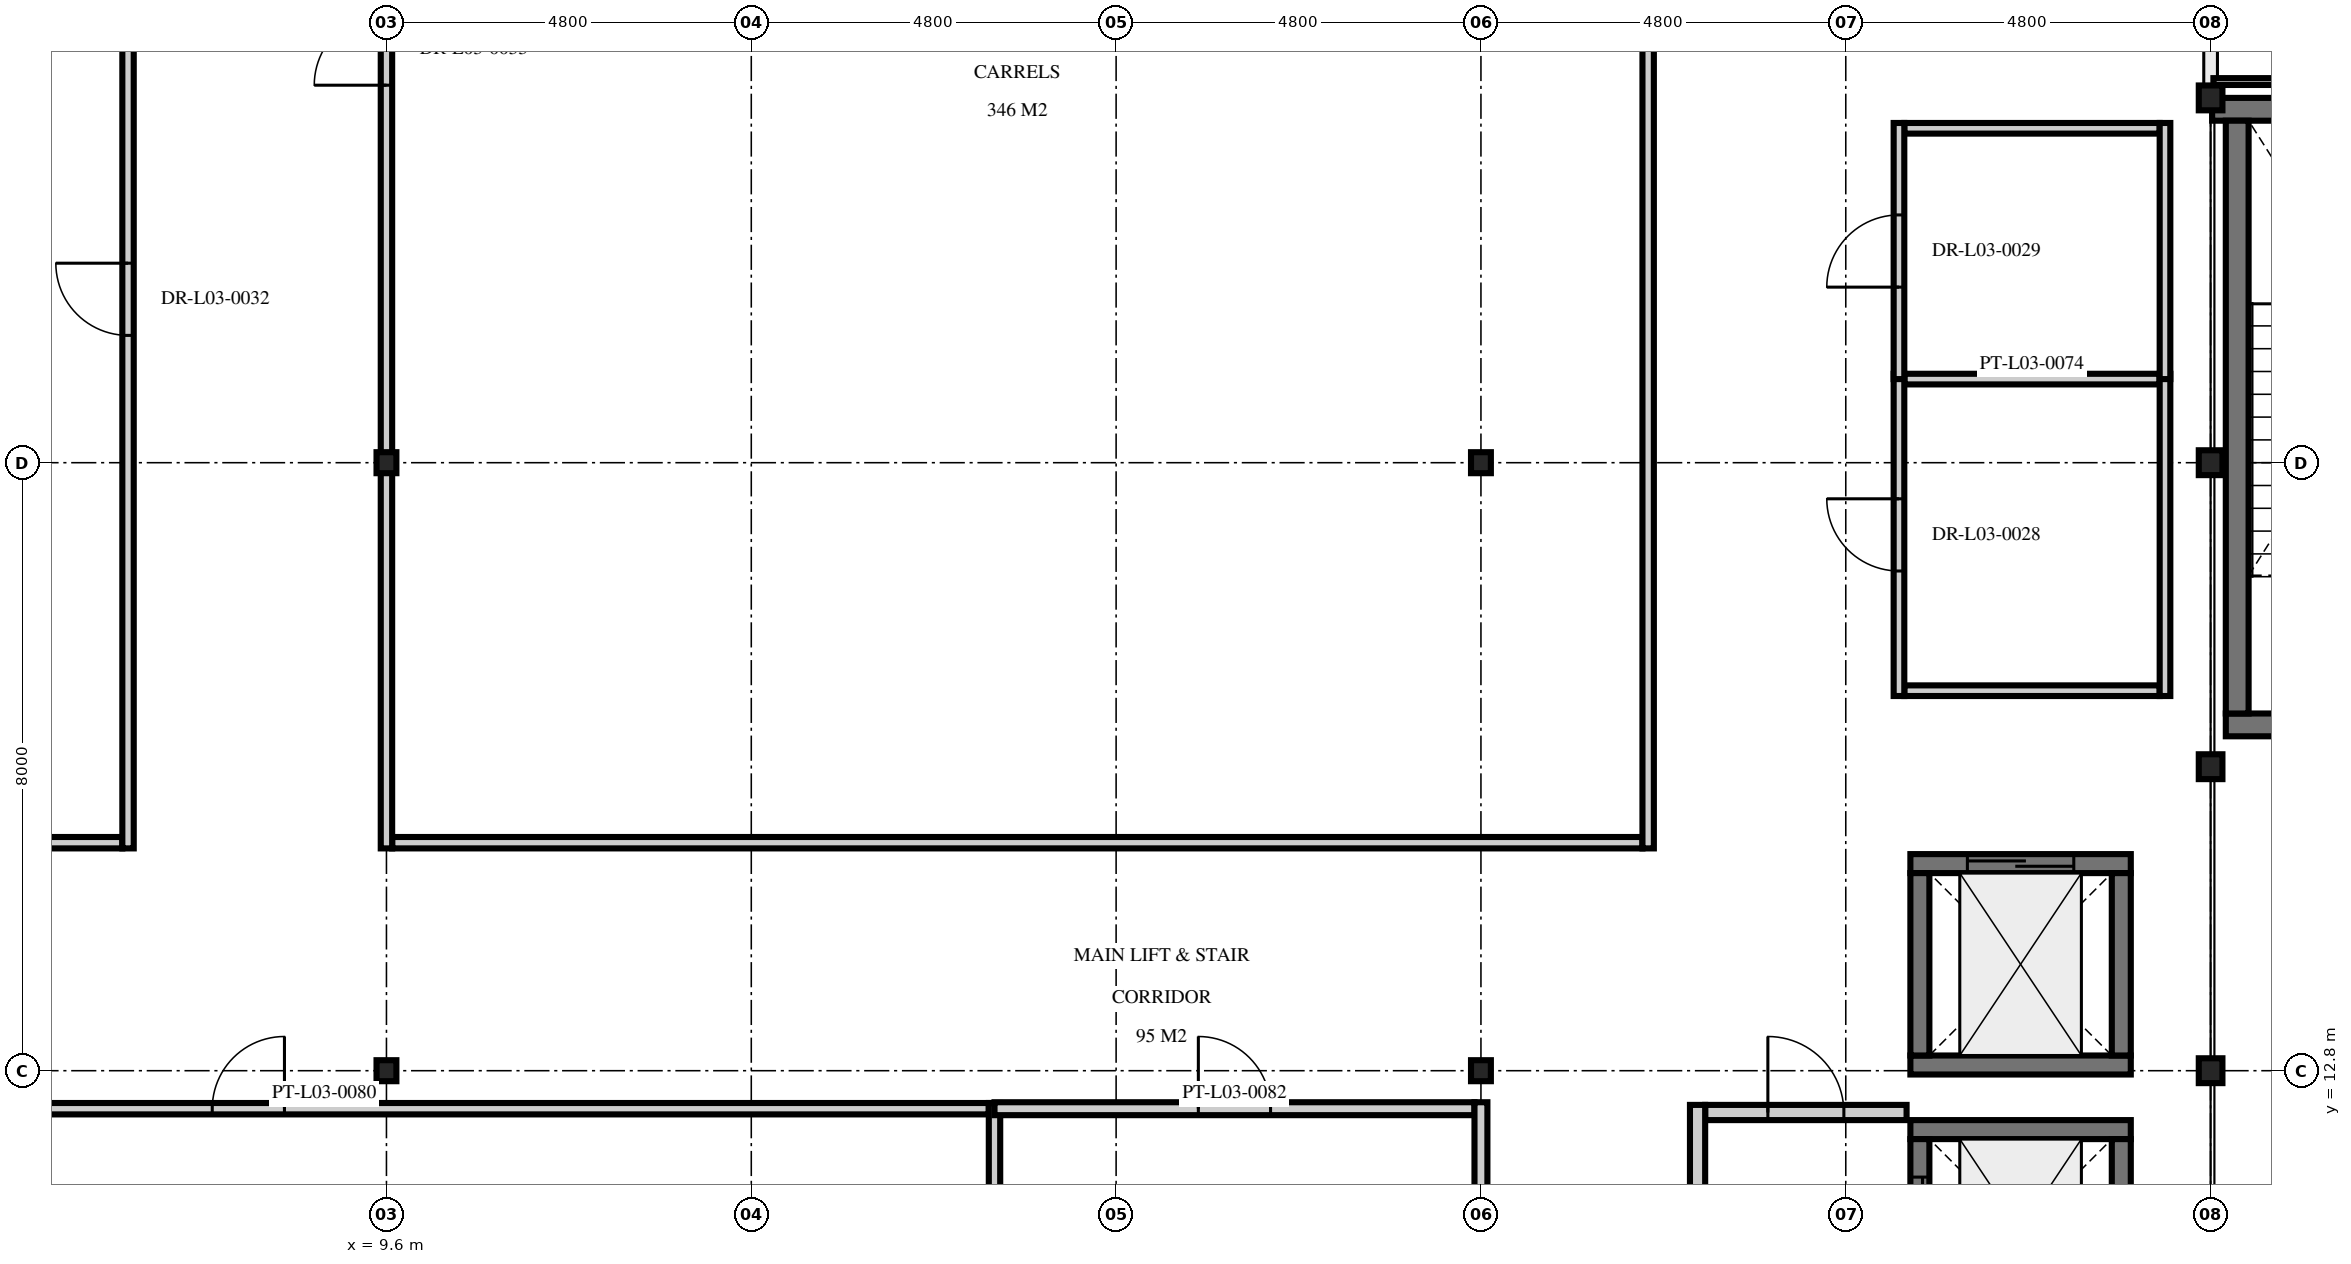
"""IFC4 building model, lengths in metres.
Left out: names, types, materials, properties, quantities, classifications, styles, units other than length and angle.
Written with IfcOpenShell. Run it as: python <this file> out.ifc"""

import sys

from ifc_helpers import new_model, si_unit, direction, frame, frame_2d, origin, origin_2d, place, context, subcontext, project, spatial, rectangle, i_section, extrude, element, fill, save


model = new_model("IFC4")
c1 = context("Model", 3, precision=1e-05, world=origin(), true_north=direction((0.0, 1.0)))
c2 = subcontext(c1, "Body", "Model", "MODEL_VIEW")
j1 = project(units=[si_unit("LENGTHUNIT", "METRE"), si_unit("PLANEANGLEUNIT", "RADIAN")], contexts=[c1])
p1 = place(None, origin())
s1 = spatial("IfcSite", under=j1, at=p1, CompositionType="ELEMENT")
p2 = place(p1, origin())
s2 = spatial("IfcBuilding", under=s1, at=p2, CompositionType="ELEMENT")
p3 = place(p2, frame((0.0, 0.0, 14.1)))
s3 = spatial("IfcBuildingStorey", under=s2, at=p3, CompositionType="ELEMENT", Elevation=14.1)
for number, where, z_axis, x_axis in (
    (1, (33.6, 12.8, 0.0), (0.0, 0.0, 1.0), (1.0, 0.0, 0.0)),
    (2, (33.6, 16.8, 0.0), (0.0, 0.0, 1.0), (1.0, 0.0, 0.0)),
    (3, (33.6, 20.8, 0.0), (0.0, 0.0, 1.0), (1.0, 0.0, 0.0)),
    (4, (33.6, 25.6, 0.0), (0.0, 0.0, 1.0), (1.0, 0.0, 0.0)),
):
    element("IfcColumn", number, at=place(p3, frame(where, z_axis=z_axis, x_axis=x_axis)), inside=s3, PredefinedType="COLUMN", context=c2, shape_type="SweptSolid", body=[
        extrude(i_section(OverallWidth=0.311, OverallDepth=0.327, WebThickness=0.016, FlangeThickness=0.025, at=origin_2d()), origin(), (0.0, 0.0, 1.0), 4.5),
    ])
for number, where, z_axis, x_axis in (
    (5, (9.6, 12.8, 0.0), (0.0, 0.0, 1.0), (1.0, 0.0, 0.0)),
    (6, (9.6, 20.8, 0.0), (0.0, 0.0, 1.0), (1.0, 0.0, 0.0)),
    (7, (24.0, 12.8, 0.0), (0.0, 0.0, 1.0), (1.0, 0.0, 0.0)),
    (8, (24.0, 20.8, 0.0), (0.0, 0.0, 1.0), (1.0, 0.0, 0.0)),
):
    element("IfcColumn", number, at=place(p3, frame(where, z_axis=z_axis, x_axis=x_axis)), inside=s3, PredefinedType="COLUMN", context=c2, shape_type="SweptSolid", body=[
        extrude(i_section(OverallWidth=0.261, OverallDepth=0.276, WebThickness=0.015, FlangeThickness=0.025, at=origin_2d()), origin(), (0.0, 0.0, 1.0), 4.5),
    ])
p4 = place(p3, frame((38.2, 17.35, 0.0), z_axis=(0.0, 0.0, 1.0), x_axis=(-1.0, 0.0, 0.0)))
e9 = element("IfcWall", 9, at=p4, inside=s3, PredefinedType="SHEAR", context=c2, shape_type="SweptSolid", body=[
    extrude(rectangle(XDim=4.4, YDim=0.3, at=frame_2d((2.2, 0.0))), origin(), (0.0, 0.0, 1.0), 4.25),
])
p5 = place(p4, frame((1.65, 0.0, 0.0)))
e10 = element("IfcOpeningElement", 10, at=p5, cuts=e9, PredefinedType="OPENING", context=c2, shape_type="SweptSolid", body=[
    extrude(rectangle(XDim=1.1, YDim=2.2, at=frame_2d((0.55, 1.1))), frame((0.0, 0.16, 0.0), z_axis=(0.0, -1.0, 0.0), x_axis=(1.0, 0.0, 0.0)), (0.0, 0.0, 1.0), 0.32),
])
p6 = place(p3, frame((33.62, 25.45, 0.0), z_axis=(0.0, 0.0, 1.0), x_axis=(1.0, 0.0, 0.0)))
e11 = element("IfcWall", 11, at=p6, inside=s3, PredefinedType="SHEAR", context=c2, shape_type="SweptSolid", body=[
    extrude(rectangle(XDim=4.76, YDim=0.3, at=frame_2d((2.38, 0.0))), origin(), (0.0, 0.0, 1.0), 4.25),
])
p7 = place(p3, frame((33.95, 17.5, 0.0), z_axis=(0.0, 0.0, 1.0), x_axis=(0.0, 1.0, 0.0)))
e12 = element("IfcWall", 12, at=p7, inside=s3, PredefinedType="SHEAR", context=c2, shape_type="SweptSolid", body=[
    extrude(rectangle(XDim=7.8, YDim=0.3, at=frame_2d((3.9, 0.0))), origin(), (0.0, 0.0, 1.0), 4.25),
])
p8 = place(p3, frame((29.65, 12.025, 0.0), z_axis=(0.0, 0.0, 1.0), x_axis=(1.0, 0.0, 0.0)))
e13 = element("IfcWall", 13, at=p8, inside=s3, PredefinedType="SHEAR", context=c2, shape_type="SweptSolid", body=[
    extrude(rectangle(XDim=2.9, YDim=0.25, at=frame_2d((1.45, 0.0))), origin(), (0.0, 0.0, 1.0), 4.25),
])
p9 = place(p3, frame((29.775, 9.5, 0.0), z_axis=(0.0, 0.0, 1.0), x_axis=(0.0, 1.0, 0.0)))
e14 = element("IfcWall", 14, at=p9, inside=s3, PredefinedType="SHEAR", context=c2, shape_type="SweptSolid", body=[
    extrude(rectangle(XDim=2.4, YDim=0.25, at=frame_2d((1.2, 0.0))), origin(), (0.0, 0.0, 1.0), 4.25),
])
p10 = place(p9, frame((0.5, 0.0, 0.0)))
e15 = element("IfcOpeningElement", 15, at=p10, cuts=e14, PredefinedType="OPENING", context=c2, shape_type="SweptSolid", body=[
    extrude(rectangle(XDim=1.4, YDim=2.2, at=frame_2d((0.7, 1.1))), frame((0.0, 0.135, 0.0), z_axis=(0.0, -1.0, 0.0), x_axis=(1.0, 0.0, 0.0)), (0.0, 0.0, 1.0), 0.27),
])
p11 = place(p3, frame((32.425, 11.9, 0.0), z_axis=(0.0, 0.0, 1.0), x_axis=(0.0, -1.0, 0.0)))
e16 = element("IfcWall", 16, at=p11, inside=s3, PredefinedType="SHEAR", context=c2, shape_type="SweptSolid", body=[
    extrude(rectangle(XDim=2.4, YDim=0.25, at=frame_2d((1.2, 0.0))), origin(), (0.0, 0.0, 1.0), 4.25),
])
p12 = place(p3, frame((32.55, 12.875, 0.0), z_axis=(0.0, 0.0, 1.0), x_axis=(-1.0, 0.0, 0.0)))
e17 = element("IfcWall", 17, at=p12, inside=s3, PredefinedType="SHEAR", context=c2, shape_type="SweptSolid", body=[
    extrude(rectangle(XDim=2.9, YDim=0.25, at=frame_2d((1.45, 0.0))), origin(), (0.0, 0.0, 1.0), 4.25),
])
p13 = place(p3, frame((29.65, 15.525, 0.0), z_axis=(0.0, 0.0, 1.0), x_axis=(1.0, 0.0, 0.0)))
e18 = element("IfcWall", 18, at=p13, inside=s3, PredefinedType="SHEAR", context=c2, shape_type="SweptSolid", body=[
    extrude(rectangle(XDim=2.9, YDim=0.25, at=frame_2d((1.45, 0.0))), origin(), (0.0, 0.0, 1.0), 4.25),
])
p14 = place(p13, frame((0.75, 0.0, 0.0)))
e19 = element("IfcOpeningElement", 19, at=p14, cuts=e18, PredefinedType="OPENING", context=c2, shape_type="SweptSolid", body=[
    extrude(rectangle(XDim=1.4, YDim=2.2, at=frame_2d((0.7, 1.1))), frame((0.0, 0.135, 0.0), z_axis=(0.0, -1.0, 0.0), x_axis=(1.0, 0.0, 0.0)), (0.0, 0.0, 1.0), 0.27),
])
for number, where, z_axis, x_axis in (
    (20, (29.775, 13.0, 0.0), (0.0, 0.0, 1.0), (0.0, 1.0, 0.0)),
    (21, (32.425, 15.4, 0.0), (0.0, 0.0, 1.0), (0.0, -1.0, 0.0)),
):
    element("IfcWall", number, at=place(p3, frame(where, z_axis=z_axis, x_axis=x_axis)), inside=s3, PredefinedType="SHEAR", context=c2, shape_type="SweptSolid", body=[
        extrude(rectangle(XDim=2.4, YDim=0.25, at=frame_2d((1.2, 0.0))), origin(), (0.0, 0.0, 1.0), 4.25),
    ])
p15 = place(p3, frame((26.95, 12.25, 0.0), z_axis=(0.0, 0.0, 1.0), x_axis=(1.0, 0.0, 0.0)))
e22 = element("IfcWall", 22, at=p15, inside=s3, PredefinedType="PARTITIONING", context=c2, shape_type="SweptSolid", body=[
    extrude(rectangle(XDim=2.65, YDim=0.2, at=frame_2d((1.325, 0.0))), origin(), (0.0, 0.0, 1.0), 4.25),
])
p16 = place(p15, frame((0.825, 0.0, 0.0)))
e23 = element("IfcOpeningElement", 23, at=p16, cuts=e22, PredefinedType="OPENING", context=c2, shape_type="SweptSolid", body=[
    extrude(rectangle(XDim=1.0, YDim=2.2, at=frame_2d((0.5, 1.1))), frame((0.0, 0.11, 0.0), z_axis=(0.0, -1.0, 0.0), x_axis=(1.0, 0.0, 0.0)), (0.0, 0.0, 1.0), 0.22),
])
p17 = place(p3, frame((26.85, 9.25, 0.0), z_axis=(0.0, 0.0, 1.0), x_axis=(0.0, 1.0, 0.0)))
e24 = element("IfcWall", 24, at=p17, inside=s3, PredefinedType="PARTITIONING", context=c2, shape_type="SweptSolid", body=[
    extrude(rectangle(XDim=3.1, YDim=0.2, at=frame_2d((1.55, 0.0))), origin(), (0.0, 0.0, 1.0), 4.25),
])
for number, where, z_axis, x_axis in (
    (25, (29.57, 17.8, 0.0), (0.0, 0.0, 1.0), (1.0, 0.0, 0.0)),
    (26, (29.57, 21.9, 0.0), (0.0, 0.0, 1.0), (1.0, 0.0, 0.0)),
):
    element("IfcWall", number, at=place(p3, frame(where, z_axis=z_axis, x_axis=x_axis)), inside=s3, PredefinedType="PARTITIONING", context=c2, shape_type="SweptSolid", body=[
        extrude(rectangle(XDim=3.36, YDim=0.14, at=frame_2d((1.68, 0.0))), origin(), (0.0, 0.0, 1.0), 3.625),
    ])
p18 = place(p3, frame((29.5, 17.73, 0.0), z_axis=(0.0, 0.0, 1.0), x_axis=(0.0, 1.0, 0.0)))
e27 = element("IfcWall", 27, at=p18, inside=s3, PredefinedType="PARTITIONING", context=c2, shape_type="SweptSolid", body=[
    extrude(rectangle(XDim=4.24, YDim=0.14, at=frame_2d((2.12, 0.0))), origin(), (0.0, 0.0, 1.0), 3.675),
])
p19 = place(p18, frame((1.645, 0.0, 0.0)))
e28 = element("IfcOpeningElement", 28, at=p19, cuts=e27, PredefinedType="OPENING", context=c2, shape_type="SweptSolid", body=[
    extrude(rectangle(XDim=0.95, YDim=2.1, at=frame_2d((0.475, 1.05))), frame((0.0, 0.08, 0.0), z_axis=(0.0, -1.0, 0.0), x_axis=(1.0, 0.0, 0.0)), (0.0, 0.0, 1.0), 0.16),
])
p20 = place(p3, frame((33.0, 17.73, 0.0), z_axis=(0.0, 0.0, 1.0), x_axis=(0.0, 1.0, 0.0)))
e29 = element("IfcWall", 29, at=p20, inside=s3, PredefinedType="PARTITIONING", context=c2, shape_type="SweptSolid", body=[
    extrude(rectangle(XDim=4.24, YDim=0.14, at=frame_2d((2.12, 0.0))), origin(), (0.0, 0.0, 1.0), 3.675),
])
p21 = place(p3, frame((29.57, 25.2, 0.0), z_axis=(0.0, 0.0, 1.0), x_axis=(1.0, 0.0, 0.0)))
e30 = element("IfcWall", 30, at=p21, inside=s3, PredefinedType="PARTITIONING", context=c2, shape_type="SweptSolid", body=[
    extrude(rectangle(XDim=3.36, YDim=0.14, at=frame_2d((1.68, 0.0))), origin(), (0.0, 0.0, 1.0), 3.625),
])
p22 = place(p3, frame((29.5, 21.9, 0.0), z_axis=(0.0, 0.0, 1.0), x_axis=(0.0, 1.0, 0.0)))
e31 = element("IfcWall", 31, at=p22, inside=s3, PredefinedType="PARTITIONING", context=c2, shape_type="SweptSolid", body=[
    extrude(rectangle(XDim=3.37, YDim=0.14, at=frame_2d((1.685, 0.0))), origin(), (0.0, 0.0, 1.0), 4.25),
])
p23 = place(p22, frame((1.21, 0.0, 0.0)))
e32 = element("IfcOpeningElement", 32, at=p23, cuts=e31, PredefinedType="OPENING", context=c2, shape_type="SweptSolid", body=[
    extrude(rectangle(XDim=0.95, YDim=2.1, at=frame_2d((0.475, 1.05))), frame((0.0, 0.08, 0.0), z_axis=(0.0, -1.0, 0.0), x_axis=(1.0, 0.0, 0.0)), (0.0, 0.0, 1.0), 0.16),
])
p24 = place(p3, frame((33.0, 21.9, 0.0), z_axis=(0.0, 0.0, 1.0), x_axis=(0.0, 1.0, 0.0)))
e33 = element("IfcWall", 33, at=p24, inside=s3, PredefinedType="PARTITIONING", context=c2, shape_type="SweptSolid", body=[
    extrude(rectangle(XDim=3.37, YDim=0.14, at=frame_2d((1.685, 0.0))), origin(), (0.0, 0.0, 1.0), 4.25),
])
p25 = place(p3, frame((0.04, 12.3, 0.0), z_axis=(0.0, 0.0, 1.0), x_axis=(1.0, 0.0, 0.0)))
e34 = element("IfcWall", 34, at=p25, inside=s3, PredefinedType="PARTITIONING", context=c2, shape_type="SweptSolid", body=[
    extrude(rectangle(XDim=17.485, YDim=0.15, at=frame_2d((8.742, 0.0))), origin(), (0.0, 0.0, 1.0), 3.625),
])
p26 = place(p25, frame((7.268, 0.0, 0.0)))
e35 = element("IfcOpeningElement", 35, at=p26, cuts=e34, PredefinedType="OPENING", context=c2, shape_type="SweptSolid", body=[
    extrude(rectangle(XDim=0.95, YDim=2.15, at=frame_2d((0.475, 1.075))), frame((0.0, 0.085, 0.0), z_axis=(0.0, -1.0, 0.0), x_axis=(1.0, 0.0, 0.0)), (0.0, 0.0, 1.0), 0.17),
])
p27 = place(p3, frame((17.6, 4.84, 0.0), z_axis=(0.0, 0.0, 1.0), x_axis=(0.0, 1.0, 0.0)))
e36 = element("IfcWall", 36, at=p27, inside=s3, PredefinedType="PARTITIONING", context=c2, shape_type="SweptSolid", body=[
    extrude(rectangle(XDim=7.535, YDim=0.15, at=frame_2d((3.768, 0.0))), origin(), (0.0, 0.0, 1.0), 3.675),
])
p28 = place(p3, frame((17.6, 12.3, 0.0), z_axis=(0.0, 0.0, 1.0), x_axis=(1.0, 0.0, 0.0)))
e37 = element("IfcWall", 37, at=p28, inside=s3, PredefinedType="PARTITIONING", context=c2, shape_type="SweptSolid", body=[
    extrude(rectangle(XDim=6.315, YDim=0.17, at=frame_2d((3.157, 0.0))), origin(), (0.0, 0.0, 1.0), 3.625),
])
p29 = place(p28, frame((2.682, 0.0, 0.0)))
e38 = element("IfcOpeningElement", 38, at=p29, cuts=e37, PredefinedType="OPENING", context=c2, shape_type="SweptSolid", body=[
    extrude(rectangle(XDim=0.95, YDim=2.15, at=frame_2d((0.475, 1.075))), frame((0.0, 0.095, 0.0), z_axis=(0.0, -1.0, 0.0), x_axis=(1.0, 0.0, 0.0)), (0.0, 0.0, 1.0), 0.19),
])
p30 = place(p3, frame((24.0, 4.84, 0.0), z_axis=(0.0, 0.0, 1.0), x_axis=(0.0, 1.0, 0.0)))
e39 = element("IfcWall", 39, at=p30, inside=s3, PredefinedType="PARTITIONING", context=c2, shape_type="SweptSolid", body=[
    extrude(rectangle(XDim=7.545, YDim=0.17, at=frame_2d((3.772, 0.0))), origin(), (0.0, 0.0, 1.0), 3.675),
])
p31 = place(p3, frame((0.04, 15.8, 0.0), z_axis=(0.0, 0.0, 1.0), x_axis=(1.0, 0.0, 0.0)))
e40 = element("IfcWall", 40, at=p31, inside=s3, PredefinedType="PARTITIONING", context=c2, shape_type="SweptSolid", body=[
    extrude(rectangle(XDim=6.085, YDim=0.15, at=frame_2d((3.042, 0.0))), origin(), (0.0, 0.0, 1.0), 3.625),
])
p32 = place(p3, frame((6.2, 15.725, 0.0), z_axis=(0.0, 0.0, 1.0), x_axis=(0.0, 1.0, 0.0)))
e41 = element("IfcWall", 41, at=p32, inside=s3, PredefinedType="PARTITIONING", context=c2, shape_type="SweptSolid", body=[
    extrude(rectangle(XDim=14.45, YDim=0.15, at=frame_2d((7.225, 0.0))), origin(), (0.0, 0.0, 1.0), 3.625),
])
p33 = place(p32, frame((6.75, 0.0, 0.0)))
e42 = element("IfcOpeningElement", 42, at=p33, cuts=e41, PredefinedType="OPENING", context=c2, shape_type="SweptSolid", body=[
    extrude(rectangle(XDim=0.95, YDim=2.15, at=frame_2d((0.475, 1.075))), frame((0.0, 0.085, 0.0), z_axis=(0.0, -1.0, 0.0), x_axis=(1.0, 0.0, 0.0)), (0.0, 0.0, 1.0), 0.17),
])
p34 = place(p3, frame((9.675, 15.8, 0.0), z_axis=(0.0, 0.0, 1.0), x_axis=(1.0, 0.0, 0.0)))
e43 = element("IfcWall", 43, at=p34, inside=s3, PredefinedType="PARTITIONING", context=c2, shape_type="SweptSolid", body=[
    extrude(rectangle(XDim=16.45, YDim=0.15, at=frame_2d((8.225, 0.0))), origin(), (0.0, 0.0, 1.0), 3.625),
])
p35 = place(p3, frame((9.6, 15.725, 0.0), z_axis=(0.0, 0.0, 1.0), x_axis=(0.0, 1.0, 0.0)))
e44 = element("IfcWall", 44, at=p35, inside=s3, PredefinedType="PARTITIONING", context=c2, shape_type="SweptSolid", body=[
    extrude(rectangle(XDim=21.035, YDim=0.15, at=frame_2d((10.518, 0.0))), origin(), (0.0, 0.0, 1.0), 3.675),
])
p36 = place(p35, frame((10.042, 0.0, 0.0)))
e45 = element("IfcOpeningElement", 45, at=p36, cuts=e44, PredefinedType="OPENING", context=c2, shape_type="SweptSolid", body=[
    extrude(rectangle(XDim=0.95, YDim=2.15, at=frame_2d((0.475, 1.075))), frame((0.0, 0.085, 0.0), z_axis=(0.0, -1.0, 0.0), x_axis=(1.0, 0.0, 0.0)), (0.0, 0.0, 1.0), 0.17),
])
p37 = place(p3, frame((26.2, 15.725, 0.0), z_axis=(0.0, 0.0, 1.0), x_axis=(0.0, 1.0, 0.0)))
e46 = element("IfcWall", 46, at=p37, inside=s3, PredefinedType="PARTITIONING", context=c2, shape_type="SweptSolid", body=[
    extrude(rectangle(XDim=21.035, YDim=0.15, at=frame_2d((10.518, 0.0))), origin(), (0.0, 0.0, 1.0), 3.675),
])
p38 = place(p10, origin())
e47 = element("IfcDoor", 47, at=p38, inside=s3, OperationType="DOUBLE_DOOR_SLIDING", PredefinedType="DOOR", context=c2, shape_type="SweptSolid", body=[
    extrude(rectangle(XDim=1.4, YDim=2.2, at=frame_2d((0.7, 1.1))), frame((0.0, 0.025, 0.0), z_axis=(0.0, -1.0, 0.0), x_axis=(1.0, 0.0, 0.0)), (0.0, 0.0, 1.0), 0.05),
])
fill(e15, e47)
p39 = place(p14, origin())
e48 = element("IfcDoor", 48, at=p39, inside=s3, OperationType="DOUBLE_DOOR_SLIDING", PredefinedType="DOOR", context=c2, shape_type="SweptSolid", body=[
    extrude(rectangle(XDim=1.4, YDim=2.2, at=frame_2d((0.7, 1.1))), frame((0.0, 0.025, 0.0), z_axis=(0.0, -1.0, 0.0), x_axis=(1.0, 0.0, 0.0)), (0.0, 0.0, 1.0), 0.05),
])
fill(e19, e48)
p40 = place(p16, origin())
e49 = element("IfcDoor", 49, at=p40, inside=s3, OperationType="SINGLE_SWING_LEFT", PredefinedType="DOOR", context=c2, shape_type="SweptSolid", body=[
    extrude(rectangle(XDim=1.0, YDim=2.2, at=frame_2d((0.5, 1.1))), frame((0.0, 0.025, 0.0), z_axis=(0.0, -1.0, 0.0), x_axis=(1.0, 0.0, 0.0)), (0.0, 0.0, 1.0), 0.05),
])
fill(e23, e49)
p41 = place(p19, origin())
e50 = element("IfcDoor", 50, at=p41, inside=s3, OperationType="SINGLE_SWING_RIGHT", PredefinedType="DOOR", context=c2, shape_type="SweptSolid", body=[
    extrude(rectangle(XDim=0.95, YDim=2.1, at=frame_2d((0.475, 1.05))), frame((0.0, 0.025, 0.0), z_axis=(0.0, -1.0, 0.0), x_axis=(1.0, 0.0, 0.0)), (0.0, 0.0, 1.0), 0.05),
])
fill(e28, e50)
p42 = place(p23, origin())
e51 = element("IfcDoor", 51, at=p42, inside=s3, OperationType="SINGLE_SWING_LEFT", PredefinedType="DOOR", context=c2, shape_type="SweptSolid", body=[
    extrude(rectangle(XDim=0.95, YDim=2.1, at=frame_2d((0.475, 1.05))), frame((0.0, 0.025, 0.0), z_axis=(0.0, -1.0, 0.0), x_axis=(1.0, 0.0, 0.0)), (0.0, 0.0, 1.0), 0.05),
])
fill(e32, e51)
p43 = place(p26, origin())
e52 = element("IfcDoor", 52, at=p43, inside=s3, OperationType="SINGLE_SWING_RIGHT", PredefinedType="DOOR", context=c2, shape_type="SweptSolid", body=[
    extrude(rectangle(XDim=0.95, YDim=2.15, at=frame_2d((0.475, 1.075))), frame((0.0, 0.025, 0.0), z_axis=(0.0, -1.0, 0.0), x_axis=(1.0, 0.0, 0.0)), (0.0, 0.0, 1.0), 0.05),
])
fill(e35, e52)
p44 = place(p29, origin())
e53 = element("IfcDoor", 53, at=p44, inside=s3, OperationType="SINGLE_SWING_LEFT", PredefinedType="DOOR", context=c2, shape_type="SweptSolid", body=[
    extrude(rectangle(XDim=0.95, YDim=2.15, at=frame_2d((0.475, 1.075))), frame((0.0, 0.025, 0.0), z_axis=(0.0, -1.0, 0.0), x_axis=(1.0, 0.0, 0.0)), (0.0, 0.0, 1.0), 0.05),
])
fill(e38, e53)
p45 = place(p33, origin())
e54 = element("IfcDoor", 54, at=p45, inside=s3, OperationType="SINGLE_SWING_RIGHT", PredefinedType="DOOR", context=c2, shape_type="SweptSolid", body=[
    extrude(rectangle(XDim=0.95, YDim=2.15, at=frame_2d((0.475, 1.075))), frame((0.0, 0.025, 0.0), z_axis=(0.0, -1.0, 0.0), x_axis=(1.0, 0.0, 0.0)), (0.0, 0.0, 1.0), 0.05),
])
fill(e42, e54)
p46 = place(p36, origin())
e55 = element("IfcDoor", 55, at=p46, inside=s3, OperationType="SINGLE_SWING_LEFT", PredefinedType="DOOR", context=c2, shape_type="SweptSolid", body=[
    extrude(rectangle(XDim=0.95, YDim=2.15, at=frame_2d((0.475, 1.075))), frame((0.0, 0.025, 0.0), z_axis=(0.0, -1.0, 0.0), x_axis=(1.0, 0.0, 0.0)), (0.0, 0.0, 1.0), 0.05),
])
fill(e45, e55)
save(model, sys.argv[1])
